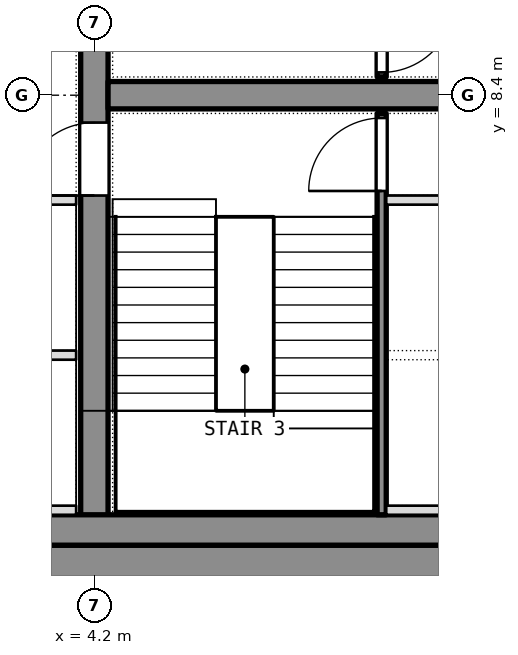
"""IFC4 building model, lengths in metres.
Left out: names, types, materials, properties, quantities, classifications, styles, units other than length and angle.
Written with IfcOpenShell. Run it as: python <this file> out.ifc"""

import sys

from ifc_helpers import new_model, si_unit, direction, frame, frame_2d, origin, place, context, subcontext, project, spatial, rectangle, extrude, element, fill, save


model = new_model("IFC4")
c1 = context("Model", 3, precision=1e-05, world=origin(), true_north=direction((0.0, 1.0)))
c2 = subcontext(c1, "Body", "Model", "MODEL_VIEW")
j1 = project(units=[si_unit("LENGTHUNIT", "METRE"), si_unit("PLANEANGLEUNIT", "RADIAN")], contexts=[c1])
p1 = place(None, origin())
s1 = spatial("IfcSite", under=j1, at=p1, CompositionType="ELEMENT")
p2 = place(p1, origin())
s2 = spatial("IfcBuilding", under=s1, at=p2, CompositionType="ELEMENT")
p3 = place(p2, frame((0.0, 0.0, 133.7)))
s3 = spatial("IfcBuildingStorey", under=s2, at=p3, CompositionType="ELEMENT", Elevation=133.7)
p4 = place(p3, frame((-11.1, 0.5, 0.0), z_axis=(0.0, 0.0, 1.0), x_axis=(1.0, 0.0, 0.0)))
e1 = element("IfcWall", 1, at=p4, inside=s3, PredefinedType="SHEAR", context=c2, shape_type="SweptSolid", body=[
    extrude(rectangle(XDim=22.2, YDim=1.0, at=frame_2d((11.1, 0.0))), origin(), (0.0, 0.0, 1.0), 3.6),
])
p5 = place(p4, frame((10.85, 0.0, 0.0)))
e2 = element("IfcOpeningElement", 2, at=p5, cuts=e1, PredefinedType="OPENING", context=c2, shape_type="SweptSolid", body=[
    extrude(rectangle(XDim=1.4, YDim=2.1, at=frame_2d((0.7, 1.05))), frame((0.0, 0.5, 0.0), z_axis=(0.0, -1.0, 0.0), x_axis=(1.0, 0.0, 0.0)), (0.0, 0.0, 1.0), 1.0),
])
p6 = place(p3, frame((4.2, 1.0, 0.0), z_axis=(0.0, 0.0, 1.0), x_axis=(0.0, 1.0, 0.0)))
e3 = element("IfcWall", 3, at=p6, inside=s3, PredefinedType="SHEAR", context=c2, shape_type="SweptSolid", body=[
    extrude(rectangle(XDim=14.8, YDim=0.45, at=frame_2d((7.4, 0.0))), origin(), (0.0, 0.0, 1.0), 3.6),
])
p7 = place(p6, frame((5.75, 0.0, 0.0)))
e4 = element("IfcOpeningElement", 4, at=p7, cuts=e3, PredefinedType="OPENING", context=c2, shape_type="SweptSolid", body=[
    extrude(rectangle(XDim=1.2, YDim=2.1, at=frame_2d((0.6, 1.05))), frame((0.0, 0.225, 0.0), z_axis=(0.0, -1.0, 0.0), x_axis=(1.0, 0.0, 0.0)), (0.0, 0.0, 1.0), 0.45),
])
p8 = place(p3, frame((4.425, 8.4, 0.0), z_axis=(0.0, 0.0, 1.0), x_axis=(1.0, 0.0, 0.0)))
e5 = element("IfcWall", 5, at=p8, inside=s3, PredefinedType="SHEAR", context=c2, shape_type="SweptSolid", body=[
    extrude(rectangle(XDim=6.675, YDim=0.45, at=frame_2d((3.337, 0.0))), origin(), (0.0, 0.0, 1.0), 3.6),
])
p9 = place(p3, frame((1.15, 1.25, 0.0), z_axis=(0.0, 0.0, 1.0), x_axis=(1.0, 0.0, 0.0)))
e6 = element("IfcWall", 6, at=p9, inside=s3, PredefinedType="PARTITIONING", context=c2, shape_type="SweptSolid", body=[
    extrude(rectangle(XDim=9.95, YDim=0.5, at=frame_2d((4.975, 0.0))), origin(), (0.0, 0.0, 1.0), 3.34),
])
p10 = place(p3, frame((8.925, 1.5, 0.0), z_axis=(0.0, 0.0, 1.0), x_axis=(0.0, 1.0, 0.0)))
e7 = element("IfcWall", 7, at=p10, inside=s3, PredefinedType="SHEAR", context=c2, shape_type="SweptSolid", body=[
    extrude(rectangle(XDim=6.6, YDim=0.15, at=frame_2d((3.3, 0.0))), origin(), (0.0, 0.0, 1.0), 3.34),
])
p11 = place(p10, frame((5.325, 0.0, 0.0)))
e8 = element("IfcOpeningElement", 8, at=p11, cuts=e7, PredefinedType="OPENING", context=c2, shape_type="SweptSolid", body=[
    extrude(rectangle(XDim=1.2, YDim=2.1, at=frame_2d((0.6, 1.05))), frame((0.0, 0.075, 0.0), z_axis=(0.0, -1.0, 0.0), x_axis=(1.0, 0.0, 0.0)), (0.0, 0.0, 1.0), 0.15),
])
for number, where, z_axis, x_axis in (
    (9, (9.0, 6.675, 0.0), (0.0, 0.0, 1.0), (1.0, 0.0, 0.0)),
    (10, (9.0, 1.575, 0.0), (0.0, 0.0, 1.0), (1.0, 0.0, 0.0)),
):
    element("IfcWall", number, at=place(p3, frame(where, z_axis=z_axis, x_axis=x_axis)), inside=s3, PredefinedType="SHEAR", context=c2, shape_type="SweptSolid", body=[
        extrude(rectangle(XDim=2.1, YDim=0.15, at=frame_2d((1.05, 0.0))), origin(), (0.0, 0.0, 1.0), 3.6),
    ])
p12 = place(p3, frame((8.925, 8.7, 0.0), z_axis=(0.0, 0.0, 1.0), x_axis=(0.0, 1.0, 0.0)))
e11 = element("IfcWall", 11, at=p12, inside=s3, PredefinedType="SHEAR", context=c2, shape_type="SweptSolid", body=[
    extrude(rectangle(XDim=6.6, YDim=0.15, at=frame_2d((3.3, 0.0))), origin(), (0.0, 0.0, 1.0), 3.34),
])
p13 = place(p12, frame((0.075, 0.0, 0.0)))
e12 = element("IfcOpeningElement", 12, at=p13, cuts=e11, PredefinedType="OPENING", context=c2, shape_type="SweptSolid", body=[
    extrude(rectangle(XDim=1.2, YDim=2.1, at=frame_2d((0.6, 1.05))), frame((0.0, 0.075, 0.0), z_axis=(0.0, -1.0, 0.0), x_axis=(1.0, 0.0, 0.0)), (0.0, 0.0, 1.0), 0.15),
])
p14 = place(p3, frame((-3.9, 4.125, 0.0), z_axis=(0.0, 0.0, 1.0), x_axis=(1.0, 0.0, 0.0)))
e13 = element("IfcWall", 13, at=p14, inside=s3, PredefinedType="PARTITIONING", context=c2, shape_type="SweptSolid", body=[
    extrude(rectangle(XDim=7.8, YDim=0.15, at=frame_2d((3.9, 0.0))), origin(), (0.0, 0.0, 1.0), 3.34),
])
p15 = place(p14, frame((3.75, 0.0, 0.0)))
e14 = element("IfcOpeningElement", 14, at=p15, cuts=e13, PredefinedType="OPENING", context=c2, shape_type="SweptSolid", body=[
    extrude(rectangle(XDim=1.2, YDim=2.1, at=frame_2d((0.6, 1.05))), frame((0.0, 0.075, 0.0), z_axis=(0.0, -1.0, 0.0), x_axis=(1.0, 0.0, 0.0)), (0.0, 0.0, 1.0), 0.15),
])
for number, where, z_axis, x_axis in (
    (15, (1.65, 1.575, 0.0), (0.0, 0.0, 1.0), (1.0, 0.0, 0.0)),
    (16, (1.65, 6.675, 0.0), (0.0, 0.0, 1.0), (1.0, 0.0, 0.0)),
):
    element("IfcWall", number, at=place(p3, frame(where, z_axis=z_axis, x_axis=x_axis)), inside=s3, PredefinedType="SHEAR", context=c2, shape_type="SweptSolid", body=[
        extrude(rectangle(XDim=2.25, YDim=0.15, at=frame_2d((1.125, 0.0))), origin(), (0.0, 0.0, 1.0), 3.6),
    ])
p16 = place(p11, origin())
e17 = element("IfcDoor", 17, at=p16, inside=s3, OperationType="SINGLE_SWING_LEFT", PredefinedType="DOOR", context=c2, shape_type="SweptSolid", body=[
    extrude(rectangle(XDim=1.2, YDim=2.1, at=frame_2d((0.6, 1.05))), frame((0.0, 0.025, 0.0), z_axis=(0.0, -1.0, 0.0), x_axis=(1.0, 0.0, 0.0)), (0.0, 0.0, 1.0), 0.05),
])
fill(e8, e17)
p17 = place(p13, origin())
e18 = element("IfcDoor", 18, at=p17, inside=s3, OperationType="SINGLE_SWING_LEFT", PredefinedType="DOOR", context=c2, shape_type="SweptSolid", body=[
    extrude(rectangle(XDim=1.2, YDim=2.1, at=frame_2d((0.6, 1.05))), frame((0.0, 0.025, 0.0), z_axis=(0.0, -1.0, 0.0), x_axis=(1.0, 0.0, 0.0)), (0.0, 0.0, 1.0), 0.05),
])
fill(e12, e18)
p18 = place(p7, origin())
e19 = element("IfcDoor", 19, at=p18, inside=s3, OperationType="SINGLE_SWING_LEFT", PredefinedType="DOOR", context=c2, shape_type="SweptSolid", body=[
    extrude(rectangle(XDim=1.2, YDim=2.1, at=frame_2d((0.6, 1.05))), frame((0.0, 0.025, 0.0), z_axis=(0.0, -1.0, 0.0), x_axis=(1.0, 0.0, 0.0)), (0.0, 0.0, 1.0), 0.05),
])
fill(e4, e19)
save(model, sys.argv[1])
